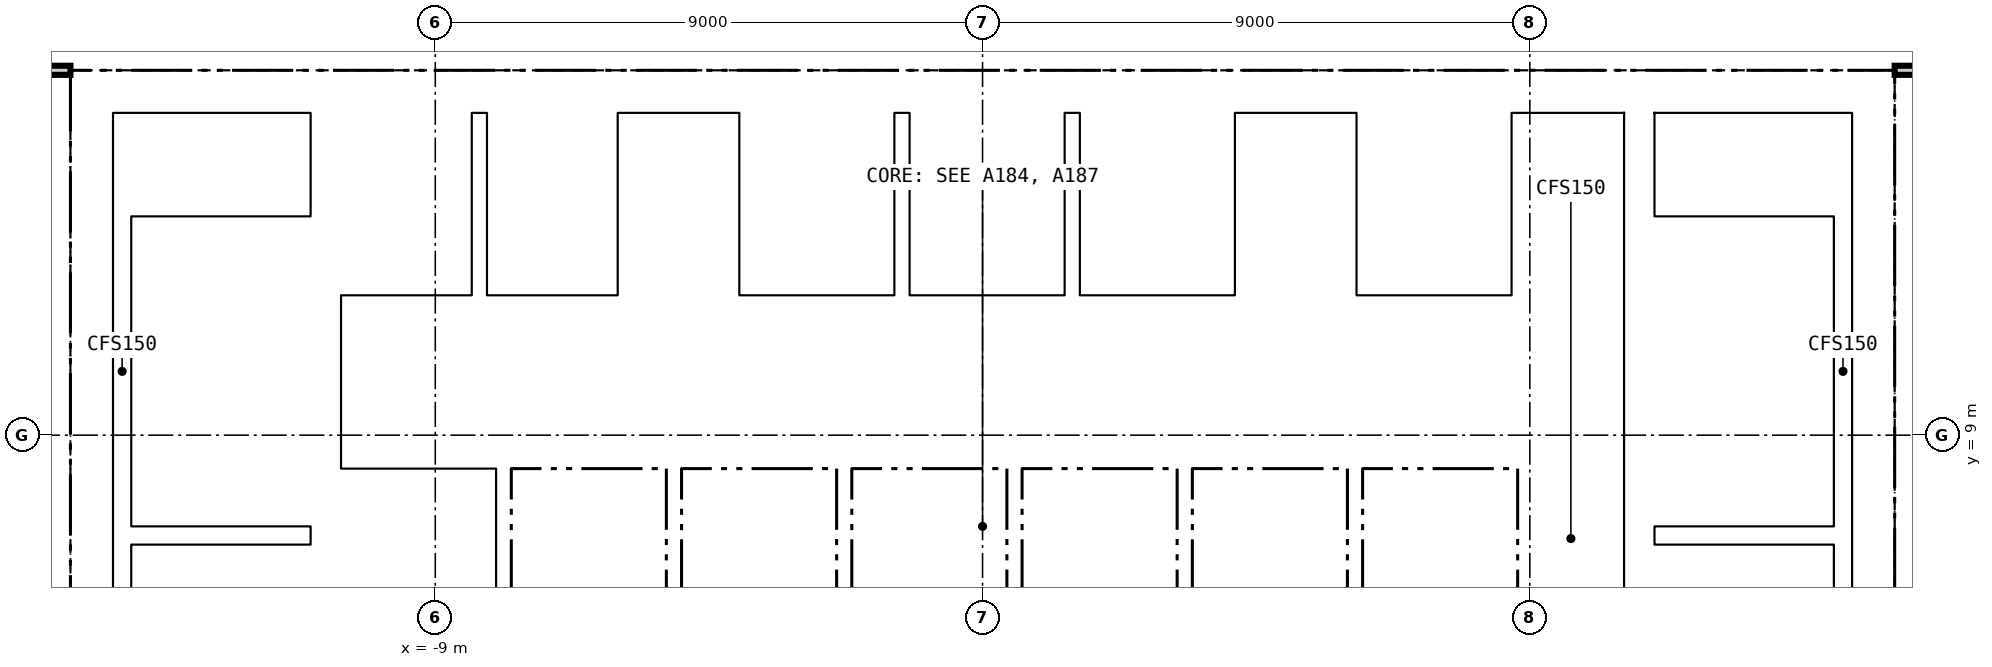
"""IFC4 building model, lengths in metres.
Left out: names, types, materials, properties, quantities, classifications, styles, units other than length and angle.
Written with IfcOpenShell. Run it as: python <this file> out.ifc"""

import sys

from ifc_helpers import new_model, si_unit, direction, frame, frame_2d, origin, place, context, subcontext, project, spatial, rectangle, extrude, element, fill, save


model = new_model("IFC4")
c1 = context("Model", 3, precision=1e-05, world=origin(), true_north=direction((0.0, 1.0)))
c2 = subcontext(c1, "Body", "Model", "MODEL_VIEW")
j1 = project(units=[si_unit("LENGTHUNIT", "METRE"), si_unit("PLANEANGLEUNIT", "RADIAN")], contexts=[c1])
p1 = place(None, origin())
s1 = spatial("IfcSite", under=j1, at=p1, CompositionType="ELEMENT")
p2 = place(p1, origin())
s2 = spatial("IfcBuilding", under=s1, at=p2, CompositionType="ELEMENT")
p3 = place(p2, frame((0.0, 0.0, 181.75)))
s3 = spatial("IfcBuildingStorey", under=s2, at=p3, CompositionType="ELEMENT", Elevation=181.75)
p4 = place(p3, frame((-15.0, 14.65, -0.15), z_axis=(0.0, 0.0, 1.0), x_axis=(1.0, 0.0, 0.0)))
e1 = element("IfcWall", 1, at=p4, inside=s3, PredefinedType="SOLIDWALL", context=c2, shape_type="SweptSolid", body=[
    extrude(rectangle(XDim=30.0, YDim=0.7, at=frame_2d((15.0, 0.0))), origin(), (0.0, 0.0, 1.0), 3.65),
])
p5 = place(p4, frame((9.25, 0.0, 0.15)))
e2 = element("IfcOpeningElement", 2, at=p5, cuts=e1, PredefinedType="OPENING", context=c2, shape_type="SweptSolid", body=[
    extrude(rectangle(XDim=1.5, YDim=2.1, at=frame_2d((0.75, 1.05))), frame((0.0, 0.36, 0.0), z_axis=(0.0, -1.0, 0.0), x_axis=(1.0, 0.0, 0.0)), (0.0, 0.0, 1.0), 0.72),
])
p6 = place(p4, frame((19.4, 0.0, 0.15)))
e3 = element("IfcOpeningElement", 3, at=p6, cuts=e1, PredefinedType="OPENING", context=c2, shape_type="SweptSolid", body=[
    extrude(rectangle(XDim=1.5, YDim=2.1, at=frame_2d((0.75, 1.05))), frame((0.0, 0.36, 0.0), z_axis=(0.0, -1.0, 0.0), x_axis=(1.0, 0.0, 0.0)), (0.0, 0.0, 1.0), 0.72),
])
p7 = place(p4, frame((1.5, 0.0, 0.15)))
e4 = element("IfcOpeningElement", 4, at=p7, cuts=e1, PredefinedType="OPENING", context=c2, shape_type="SweptSolid", body=[
    extrude(rectangle(XDim=1.2, YDim=2.1, at=frame_2d((0.6, 1.05))), frame((0.0, 0.36, 0.0), z_axis=(0.0, -1.0, 0.0), x_axis=(1.0, 0.0, 0.0)), (0.0, 0.0, 1.0), 0.72),
])
p8 = place(p4, frame((27.3, 0.0, 0.15)))
e5 = element("IfcOpeningElement", 5, at=p8, cuts=e1, PredefinedType="OPENING", context=c2, shape_type="SweptSolid", body=[
    extrude(rectangle(XDim=1.2, YDim=2.1, at=frame_2d((0.6, 1.05))), frame((0.0, 0.36, 0.0), z_axis=(0.0, -1.0, 0.0), x_axis=(1.0, 0.0, 0.0)), (0.0, 0.0, 1.0), 0.72),
])
for number, where, z_axis, x_axis in (
    (6, (-14.65, 0.7, -0.15), (0.0, 0.0, 1.0), (0.0, 1.0, 0.0)),
    (7, (14.65, 0.7, -0.15), (0.0, 0.0, 1.0), (0.0, 1.0, 0.0)),
):
    element("IfcWall", number, at=place(p3, frame(where, z_axis=z_axis, x_axis=x_axis)), inside=s3, PredefinedType="SOLIDWALL", context=c2, shape_type="SweptSolid", body=[
        extrude(rectangle(XDim=13.6, YDim=0.7, at=frame_2d((6.8, 0.0))), origin(), (0.0, 0.0, 1.0), 3.65),
    ])
for number, where, z_axis, x_axis in (
    (8, (-10.8, 0.7, -0.15), (0.0, 0.0, 1.0), (0.0, 1.0, 0.0)),
    (9, (10.8, 0.7, -0.15), (0.0, 0.0, 1.0), (0.0, 1.0, 0.0)),
):
    element("IfcWall", number, at=place(p3, frame(where, z_axis=z_axis, x_axis=x_axis)), inside=s3, PredefinedType="SOLIDWALL", context=c2, shape_type="SweptSolid", body=[
        extrude(rectangle(XDim=13.6, YDim=0.5, at=frame_2d((6.8, 0.0))), origin(), (0.0, 0.0, 1.0), 3.65),
    ])
p9 = place(p3, frame((-10.55, 8.55, 0.0), z_axis=(0.0, 0.0, 1.0), x_axis=(1.0, 0.0, 0.0)))
e10 = element("IfcWall", 10, at=p9, inside=s3, PredefinedType="PARTITIONING", context=c2, shape_type="SweptSolid", body=[
    extrude(rectangle(XDim=21.1, YDim=0.2, at=frame_2d((10.55, 0.0))), origin(), (0.0, 0.0, 1.0), 3.5),
])
p10 = place(p9, frame((0.675, 0.0, 0.0)))
e11 = element("IfcOpeningElement", 11, at=p10, cuts=e10, PredefinedType="OPENING", context=c2, shape_type="SweptSolid", body=[
    extrude(rectangle(XDim=1.2, YDim=2.1, at=frame_2d((0.6, 1.05))), frame((0.0, 0.11, 0.0), z_axis=(0.0, -1.0, 0.0), x_axis=(1.0, 0.0, 0.0)), (0.0, 0.0, 1.0), 0.22),
])
p11 = place(p9, frame((3.475, 0.0, 0.0)))
e12 = element("IfcOpeningElement", 12, at=p11, cuts=e10, PredefinedType="OPENING", context=c2, shape_type="SweptSolid", body=[
    extrude(rectangle(XDim=1.2, YDim=2.1, at=frame_2d((0.6, 1.05))), frame((0.0, 0.11, 0.0), z_axis=(0.0, -1.0, 0.0), x_axis=(1.0, 0.0, 0.0)), (0.0, 0.0, 1.0), 0.22),
])
p12 = place(p9, frame((6.275, 0.0, 0.0)))
e13 = element("IfcOpeningElement", 13, at=p12, cuts=e10, PredefinedType="OPENING", context=c2, shape_type="SweptSolid", body=[
    extrude(rectangle(XDim=1.2, YDim=2.1, at=frame_2d((0.6, 1.05))), frame((0.0, 0.11, 0.0), z_axis=(0.0, -1.0, 0.0), x_axis=(1.0, 0.0, 0.0)), (0.0, 0.0, 1.0), 0.22),
])
p13 = place(p9, frame((9.075, 0.0, 0.0)))
e14 = element("IfcOpeningElement", 14, at=p13, cuts=e10, PredefinedType="OPENING", context=c2, shape_type="SweptSolid", body=[
    extrude(rectangle(XDim=1.2, YDim=2.1, at=frame_2d((0.6, 1.05))), frame((0.0, 0.11, 0.0), z_axis=(0.0, -1.0, 0.0), x_axis=(1.0, 0.0, 0.0)), (0.0, 0.0, 1.0), 0.22),
])
p14 = place(p9, frame((11.875, 0.0, 0.0)))
e15 = element("IfcOpeningElement", 15, at=p14, cuts=e10, PredefinedType="OPENING", context=c2, shape_type="SweptSolid", body=[
    extrude(rectangle(XDim=1.2, YDim=2.1, at=frame_2d((0.6, 1.05))), frame((0.0, 0.11, 0.0), z_axis=(0.0, -1.0, 0.0), x_axis=(1.0, 0.0, 0.0)), (0.0, 0.0, 1.0), 0.22),
])
p15 = place(p9, frame((14.675, 0.0, 0.0)))
e16 = element("IfcOpeningElement", 16, at=p15, cuts=e10, PredefinedType="OPENING", context=c2, shape_type="SweptSolid", body=[
    extrude(rectangle(XDim=1.2, YDim=2.1, at=frame_2d((0.6, 1.05))), frame((0.0, 0.11, 0.0), z_axis=(0.0, -1.0, 0.0), x_axis=(1.0, 0.0, 0.0)), (0.0, 0.0, 1.0), 0.22),
])
p16 = place(p9, frame((17.475, 0.0, 0.0)))
e17 = element("IfcOpeningElement", 17, at=p16, cuts=e10, PredefinedType="OPENING", context=c2, shape_type="SweptSolid", body=[
    extrude(rectangle(XDim=1.2, YDim=2.1, at=frame_2d((0.6, 1.05))), frame((0.0, 0.11, 0.0), z_axis=(0.0, -1.0, 0.0), x_axis=(1.0, 0.0, 0.0)), (0.0, 0.0, 1.0), 0.22),
])
p17 = place(p9, frame((19.9, 0.0, 0.0)))
e18 = element("IfcOpeningElement", 18, at=p17, cuts=e10, PredefinedType="OPENING", context=c2, shape_type="SweptSolid", body=[
    extrude(rectangle(XDim=0.9, YDim=2.1, at=frame_2d((0.45, 1.05))), frame((0.0, 0.11, 0.0), z_axis=(0.0, -1.0, 0.0), x_axis=(1.0, 0.0, 0.0)), (0.0, 0.0, 1.0), 0.22),
])
p18 = place(p3, frame((-10.55, 11.2, 0.0), z_axis=(0.0, 0.0, 1.0), x_axis=(1.0, 0.0, 0.0)))
e19 = element("IfcWall", 19, at=p18, inside=s3, PredefinedType="PARTITIONING", context=c2, shape_type="SweptSolid", body=[
    extrude(rectangle(XDim=4.8, YDim=0.2, at=frame_2d((2.4, 0.0))), origin(), (0.0, 0.0, 1.0), 3.5),
])
p19 = place(p18, frame((0.525, 0.0, 0.0)))
e20 = element("IfcOpeningElement", 20, at=p19, cuts=e19, PredefinedType="OPENING", context=c2, shape_type="SweptSolid", body=[
    extrude(rectangle(XDim=1.1, YDim=2.1, at=frame_2d((0.55, 1.05))), frame((0.0, 0.11, 0.0), z_axis=(0.0, -1.0, 0.0), x_axis=(1.0, 0.0, 0.0)), (0.0, 0.0, 1.0), 0.22),
])
p20 = place(p18, frame((2.925, 0.0, 0.0)))
e21 = element("IfcOpeningElement", 21, at=p20, cuts=e19, PredefinedType="OPENING", context=c2, shape_type="SweptSolid", body=[
    extrude(rectangle(XDim=1.1, YDim=2.1, at=frame_2d((0.55, 1.05))), frame((0.0, 0.11, 0.0), z_axis=(0.0, -1.0, 0.0), x_axis=(1.0, 0.0, 0.0)), (0.0, 0.0, 1.0), 0.22),
])
p21 = place(p3, frame((-4.25, 11.2, 0.0), z_axis=(0.0, 0.0, 1.0), x_axis=(1.0, 0.0, 0.0)))
e22 = element("IfcWall", 22, at=p21, inside=s3, PredefinedType="PARTITIONING", context=c2, shape_type="SweptSolid", body=[
    extrude(rectangle(XDim=8.65, YDim=0.2, at=frame_2d((4.325, 0.0))), origin(), (0.0, 0.0, 1.0), 3.5),
])
p22 = place(p21, frame((0.825, 0.0, 0.0)))
e23 = element("IfcOpeningElement", 23, at=p22, cuts=e22, PredefinedType="OPENING", context=c2, shape_type="SweptSolid", body=[
    extrude(rectangle(XDim=1.4, YDim=2.1, at=frame_2d((0.7, 1.05))), frame((0.0, 0.11, 0.0), z_axis=(0.0, -1.0, 0.0), x_axis=(1.0, 0.0, 0.0)), (0.0, 0.0, 1.0), 0.22),
])
p23 = place(p21, frame((3.625, 0.0, 0.0)))
e24 = element("IfcOpeningElement", 24, at=p23, cuts=e22, PredefinedType="OPENING", context=c2, shape_type="SweptSolid", body=[
    extrude(rectangle(XDim=1.4, YDim=2.1, at=frame_2d((0.7, 1.05))), frame((0.0, 0.11, 0.0), z_axis=(0.0, -1.0, 0.0), x_axis=(1.0, 0.0, 0.0)), (0.0, 0.0, 1.0), 0.22),
])
p24 = place(p3, frame((5.9, 11.2, 0.0), z_axis=(0.0, 0.0, 1.0), x_axis=(1.0, 0.0, 0.0)))
e25 = element("IfcWall", 25, at=p24, inside=s3, PredefinedType="PARTITIONING", context=c2, shape_type="SweptSolid", body=[
    extrude(rectangle(XDim=4.65, YDim=0.2, at=frame_2d((2.325, 0.0))), origin(), (0.0, 0.0, 1.0), 3.5),
])
p25 = place(p24, frame((3.4, 0.0, 0.0)))
e26 = element("IfcOpeningElement", 26, at=p25, cuts=e25, PredefinedType="OPENING", context=c2, shape_type="SweptSolid", body=[
    extrude(rectangle(XDim=0.9, YDim=2.1, at=frame_2d((0.45, 1.05))), frame((0.0, 0.11, 0.0), z_axis=(0.0, -1.0, 0.0), x_axis=(1.0, 0.0, 0.0)), (0.0, 0.0, 1.0), 0.22),
])
p26 = place(p3, frame((-4.125, 8.65, 0.0), z_axis=(0.0, 0.0, 1.0), x_axis=(0.0, 1.0, 0.0)))
e27 = element("IfcWall", 27, at=p26, inside=s3, PredefinedType="PARTITIONING", context=c2, shape_type="SweptSolid", body=[
    extrude(rectangle(XDim=2.45, YDim=0.25, at=frame_2d((1.225, 0.0))), origin(), (0.0, 0.0, 1.0), 3.5),
])
p27 = place(p26, frame((0.625, 0.0, 0.0)))
e28 = element("IfcOpeningElement", 28, at=p27, cuts=e27, PredefinedType="OPENING", context=c2, shape_type="SweptSolid", body=[
    extrude(rectangle(XDim=1.2, YDim=2.1, at=frame_2d((0.6, 1.05))), frame((0.0, 0.135, 0.0), z_axis=(0.0, -1.0, 0.0), x_axis=(1.0, 0.0, 0.0)), (0.0, 0.0, 1.0), 0.27),
])
for number, where, z_axis, x_axis in (
    (29, (-7.875, 6.15, 0.0), (0.0, 0.0, 1.0), (0.0, 1.0, 0.0)),
    (30, (-5.075, 6.15, 0.0), (0.0, 0.0, 1.0), (0.0, 1.0, 0.0)),
    (31, (-2.275, 6.15, 0.0), (0.0, 0.0, 1.0), (0.0, 1.0, 0.0)),
    (32, (0.525, 6.15, 0.0), (0.0, 0.0, 1.0), (0.0, 1.0, 0.0)),
    (33, (3.325, 6.15, 0.0), (0.0, 0.0, 1.0), (0.0, 1.0, 0.0)),
    (34, (6.125, 6.15, 0.0), (0.0, 0.0, 1.0), (0.0, 1.0, 0.0)),
    (35, (8.925, 6.15, 0.0), (0.0, 0.0, 1.0), (0.0, 1.0, 0.0)),
):
    element("IfcWall", number, at=place(p3, frame(where, z_axis=z_axis, x_axis=x_axis)), inside=s3, PredefinedType="PARTITIONING", context=c2, shape_type="SweptSolid", body=[
        extrude(rectangle(XDim=2.3, YDim=0.25, at=frame_2d((1.15, 0.0))), origin(), (0.0, 0.0, 1.0), 3.5),
    ])
for number, where, z_axis, x_axis in (
    (36, (-8.275, 11.3, 0.0), (0.0, 0.0, 1.0), (0.0, 1.0, 0.0)),
    (37, (-5.875, 11.3, 0.0), (0.0, 0.0, 1.0), (0.0, 1.0, 0.0)),
    (38, (-4.125, 11.3, 0.0), (0.0, 0.0, 1.0), (0.0, 1.0, 0.0)),
    (39, (-1.325, 11.3, 0.0), (0.0, 0.0, 1.0), (0.0, 1.0, 0.0)),
    (40, (1.475, 11.3, 0.0), (0.0, 0.0, 1.0), (0.0, 1.0, 0.0)),
    (41, (4.275, 11.3, 0.0), (0.0, 0.0, 1.0), (0.0, 1.0, 0.0)),
    (42, (6.025, 11.3, 0.0), (0.0, 0.0, 1.0), (0.0, 1.0, 0.0)),
    (43, (8.825, 11.3, 0.0), (0.0, 0.0, 1.0), (0.0, 1.0, 0.0)),
):
    element("IfcWall", number, at=place(p3, frame(where, z_axis=z_axis, x_axis=x_axis)), inside=s3, PredefinedType="PARTITIONING", context=c2, shape_type="SweptSolid", body=[
        extrude(rectangle(XDim=3.0, YDim=0.25, at=frame_2d((1.5, 0.0))), origin(), (0.0, 0.0, 1.0), 3.5),
    ])
p28 = place(p3, frame((-14.0, 7.35, 0.0), z_axis=(0.0, 0.0, 1.0), x_axis=(1.0, 0.0, 0.0)))
e44 = element("IfcWall", 44, at=p28, inside=s3, PredefinedType="SOLIDWALL", context=c2, shape_type="SweptSolid", body=[
    extrude(rectangle(XDim=2.95, YDim=0.3, at=frame_2d((1.475, 0.0))), origin(), (0.0, 0.0, 1.0), 3.5),
])
p29 = place(p3, frame((-14.15, 0.7, 0.0), z_axis=(0.0, 0.0, 1.0), x_axis=(0.0, 1.0, 0.0)))
e45 = element("IfcWall", 45, at=p29, inside=s3, PredefinedType="SOLIDWALL", context=c2, shape_type="SweptSolid", body=[
    extrude(rectangle(XDim=13.6, YDim=0.3, at=frame_2d((6.8, 0.0))), origin(), (0.0, 0.0, 1.0), 3.5),
])
p30 = place(p3, frame((11.05, 7.35, 0.0), z_axis=(0.0, 0.0, 1.0), x_axis=(1.0, 0.0, 0.0)))
e46 = element("IfcWall", 46, at=p30, inside=s3, PredefinedType="SOLIDWALL", context=c2, shape_type="SweptSolid", body=[
    extrude(rectangle(XDim=2.95, YDim=0.3, at=frame_2d((1.475, 0.0))), origin(), (0.0, 0.0, 1.0), 3.5),
])
p31 = place(p3, frame((14.15, 0.7, 0.0), z_axis=(0.0, 0.0, 1.0), x_axis=(0.0, 1.0, 0.0)))
e47 = element("IfcWall", 47, at=p31, inside=s3, PredefinedType="SOLIDWALL", context=c2, shape_type="SweptSolid", body=[
    extrude(rectangle(XDim=13.6, YDim=0.3, at=frame_2d((6.8, 0.0))), origin(), (0.0, 0.0, 1.0), 3.5),
])
p32 = place(p3, frame((-15.0, 15.0, 0.0), z_axis=(0.0, 0.0, 1.0), x_axis=(-1.0, 0.0, 0.0)))
e48 = element("IfcWall", 48, at=p32, inside=s3, PredefinedType="PARTITIONING", context=c2, shape_type="SweptSolid", body=[
    extrude(rectangle(XDim=1.364, YDim=0.15, at=frame_2d((0.682, 0.0))), origin(), (0.0, 0.0, 1.0), 2.741),
])
p33 = place(p3, frame((16.439, 15.0, 0.0), z_axis=(0.0, 0.0, 1.0), x_axis=(-1.0, 0.0, 0.0)))
e49 = element("IfcWall", 49, at=p33, inside=s3, PredefinedType="PARTITIONING", context=c2, shape_type="SweptSolid", body=[
    extrude(rectangle(XDim=1.439, YDim=0.15, at=frame_2d((0.719, 0.0))), origin(), (0.0, 0.0, 1.0), 2.741),
])
p34 = place(p27, origin())
e50 = element("IfcDoor", 50, at=p34, inside=s3, OperationType="SINGLE_SWING_LEFT", PredefinedType="DOOR", context=c2, shape_type="SweptSolid", body=[
    extrude(rectangle(XDim=1.2, YDim=2.1, at=frame_2d((0.6, 1.05))), frame((0.0, 0.025, 0.0), z_axis=(0.0, -1.0, 0.0), x_axis=(1.0, 0.0, 0.0)), (0.0, 0.0, 1.0), 0.05),
])
fill(e28, e50)
p35 = place(p10, origin())
e51 = element("IfcDoor", 51, at=p35, inside=s3, OperationType="DOUBLE_DOOR_SLIDING", PredefinedType="DOOR", context=c2, shape_type="SweptSolid", body=[
    extrude(rectangle(XDim=1.2, YDim=2.1, at=frame_2d((0.6, 1.05))), frame((0.0, 0.025, 0.0), z_axis=(0.0, -1.0, 0.0), x_axis=(1.0, 0.0, 0.0)), (0.0, 0.0, 1.0), 0.05),
])
fill(e11, e51)
p36 = place(p11, origin())
e52 = element("IfcDoor", 52, at=p36, inside=s3, OperationType="DOUBLE_DOOR_SLIDING", PredefinedType="DOOR", context=c2, shape_type="SweptSolid", body=[
    extrude(rectangle(XDim=1.2, YDim=2.1, at=frame_2d((0.6, 1.05))), frame((0.0, 0.025, 0.0), z_axis=(0.0, -1.0, 0.0), x_axis=(1.0, 0.0, 0.0)), (0.0, 0.0, 1.0), 0.05),
])
fill(e12, e52)
p37 = place(p12, origin())
e53 = element("IfcDoor", 53, at=p37, inside=s3, OperationType="DOUBLE_DOOR_SLIDING", PredefinedType="DOOR", context=c2, shape_type="SweptSolid", body=[
    extrude(rectangle(XDim=1.2, YDim=2.1, at=frame_2d((0.6, 1.05))), frame((0.0, 0.025, 0.0), z_axis=(0.0, -1.0, 0.0), x_axis=(1.0, 0.0, 0.0)), (0.0, 0.0, 1.0), 0.05),
])
fill(e13, e53)
p38 = place(p13, origin())
e54 = element("IfcDoor", 54, at=p38, inside=s3, OperationType="DOUBLE_DOOR_SLIDING", PredefinedType="DOOR", context=c2, shape_type="SweptSolid", body=[
    extrude(rectangle(XDim=1.2, YDim=2.1, at=frame_2d((0.6, 1.05))), frame((0.0, 0.025, 0.0), z_axis=(0.0, -1.0, 0.0), x_axis=(1.0, 0.0, 0.0)), (0.0, 0.0, 1.0), 0.05),
])
fill(e14, e54)
p39 = place(p14, origin())
e55 = element("IfcDoor", 55, at=p39, inside=s3, OperationType="DOUBLE_DOOR_SLIDING", PredefinedType="DOOR", context=c2, shape_type="SweptSolid", body=[
    extrude(rectangle(XDim=1.2, YDim=2.1, at=frame_2d((0.6, 1.05))), frame((0.0, 0.025, 0.0), z_axis=(0.0, -1.0, 0.0), x_axis=(1.0, 0.0, 0.0)), (0.0, 0.0, 1.0), 0.05),
])
fill(e15, e55)
p40 = place(p15, origin())
e56 = element("IfcDoor", 56, at=p40, inside=s3, OperationType="DOUBLE_DOOR_SLIDING", PredefinedType="DOOR", context=c2, shape_type="SweptSolid", body=[
    extrude(rectangle(XDim=1.2, YDim=2.1, at=frame_2d((0.6, 1.05))), frame((0.0, 0.025, 0.0), z_axis=(0.0, -1.0, 0.0), x_axis=(1.0, 0.0, 0.0)), (0.0, 0.0, 1.0), 0.05),
])
fill(e16, e56)
p41 = place(p16, origin())
e57 = element("IfcDoor", 57, at=p41, inside=s3, OperationType="DOUBLE_DOOR_SLIDING", PredefinedType="DOOR", context=c2, shape_type="SweptSolid", body=[
    extrude(rectangle(XDim=1.2, YDim=2.1, at=frame_2d((0.6, 1.05))), frame((0.0, 0.025, 0.0), z_axis=(0.0, -1.0, 0.0), x_axis=(1.0, 0.0, 0.0)), (0.0, 0.0, 1.0), 0.05),
])
fill(e17, e57)
p42 = place(p17, origin())
e58 = element("IfcDoor", 58, at=p42, inside=s3, OperationType="SINGLE_SWING_RIGHT", PredefinedType="DOOR", context=c2, shape_type="SweptSolid", body=[
    extrude(rectangle(XDim=0.9, YDim=2.1, at=frame_2d((0.45, 1.05))), frame((0.0, 0.025, 0.0), z_axis=(0.0, -1.0, 0.0), x_axis=(1.0, 0.0, 0.0)), (0.0, 0.0, 1.0), 0.05),
])
fill(e18, e58)
p43 = place(p19, origin())
e59 = element("IfcDoor", 59, at=p43, inside=s3, OperationType="DOUBLE_DOOR_SLIDING", PredefinedType="DOOR", context=c2, shape_type="SweptSolid", body=[
    extrude(rectangle(XDim=1.1, YDim=2.1, at=frame_2d((0.55, 1.05))), frame((0.0, 0.025, 0.0), z_axis=(0.0, -1.0, 0.0), x_axis=(1.0, 0.0, 0.0)), (0.0, 0.0, 1.0), 0.05),
])
fill(e20, e59)
p44 = place(p20, origin())
e60 = element("IfcDoor", 60, at=p44, inside=s3, OperationType="DOUBLE_DOOR_SLIDING", PredefinedType="DOOR", context=c2, shape_type="SweptSolid", body=[
    extrude(rectangle(XDim=1.1, YDim=2.1, at=frame_2d((0.55, 1.05))), frame((0.0, 0.025, 0.0), z_axis=(0.0, -1.0, 0.0), x_axis=(1.0, 0.0, 0.0)), (0.0, 0.0, 1.0), 0.05),
])
fill(e21, e60)
p45 = place(p22, origin())
e61 = element("IfcDoor", 61, at=p45, inside=s3, OperationType="DOUBLE_DOOR_SLIDING", PredefinedType="DOOR", context=c2, shape_type="SweptSolid", body=[
    extrude(rectangle(XDim=1.4, YDim=2.1, at=frame_2d((0.7, 1.05))), frame((0.0, 0.025, 0.0), z_axis=(0.0, -1.0, 0.0), x_axis=(1.0, 0.0, 0.0)), (0.0, 0.0, 1.0), 0.05),
])
fill(e23, e61)
p46 = place(p23, origin())
e62 = element("IfcDoor", 62, at=p46, inside=s3, OperationType="DOUBLE_DOOR_SLIDING", PredefinedType="DOOR", context=c2, shape_type="SweptSolid", body=[
    extrude(rectangle(XDim=1.4, YDim=2.1, at=frame_2d((0.7, 1.05))), frame((0.0, 0.025, 0.0), z_axis=(0.0, -1.0, 0.0), x_axis=(1.0, 0.0, 0.0)), (0.0, 0.0, 1.0), 0.05),
])
fill(e24, e62)
p47 = place(p25, origin())
e63 = element("IfcDoor", 63, at=p47, inside=s3, OperationType="SINGLE_SWING_LEFT", PredefinedType="DOOR", context=c2, shape_type="SweptSolid", body=[
    extrude(rectangle(XDim=0.9, YDim=2.1, at=frame_2d((0.45, 1.05))), frame((0.0, 0.025, 0.0), z_axis=(0.0, -1.0, 0.0), x_axis=(1.0, 0.0, 0.0)), (0.0, 0.0, 1.0), 0.05),
])
fill(e26, e63)
p48 = place(p5, origin())
e64 = element("IfcDoor", 64, at=p48, inside=s3, OperationType="DOUBLE_DOOR_SINGLE_SWING", PredefinedType="DOOR", context=c2, shape_type="SweptSolid", body=[
    extrude(rectangle(XDim=1.5, YDim=2.1, at=frame_2d((0.75, 1.05))), frame((0.0, 0.025, 0.0), z_axis=(0.0, -1.0, 0.0), x_axis=(1.0, 0.0, 0.0)), (0.0, 0.0, 1.0), 0.05),
])
fill(e2, e64)
p49 = place(p6, origin())
e65 = element("IfcDoor", 65, at=p49, inside=s3, OperationType="DOUBLE_DOOR_SINGLE_SWING", PredefinedType="DOOR", context=c2, shape_type="SweptSolid", body=[
    extrude(rectangle(XDim=1.5, YDim=2.1, at=frame_2d((0.75, 1.05))), frame((0.0, 0.025, 0.0), z_axis=(0.0, -1.0, 0.0), x_axis=(1.0, 0.0, 0.0)), (0.0, 0.0, 1.0), 0.05),
])
fill(e3, e65)
p50 = place(p7, origin())
e66 = element("IfcDoor", 66, at=p50, inside=s3, OperationType="SINGLE_SWING_RIGHT", PredefinedType="DOOR", context=c2, shape_type="SweptSolid", body=[
    extrude(rectangle(XDim=1.2, YDim=2.1, at=frame_2d((0.6, 1.05))), frame((0.0, 0.025, 0.0), z_axis=(0.0, -1.0, 0.0), x_axis=(1.0, 0.0, 0.0)), (0.0, 0.0, 1.0), 0.05),
])
fill(e4, e66)
p51 = place(p8, origin())
e67 = element("IfcDoor", 67, at=p51, inside=s3, OperationType="SINGLE_SWING_LEFT", PredefinedType="DOOR", context=c2, shape_type="SweptSolid", body=[
    extrude(rectangle(XDim=1.2, YDim=2.1, at=frame_2d((0.6, 1.05))), frame((0.0, 0.025, 0.0), z_axis=(0.0, -1.0, 0.0), x_axis=(1.0, 0.0, 0.0)), (0.0, 0.0, 1.0), 0.05),
])
fill(e5, e67)
save(model, sys.argv[1])
